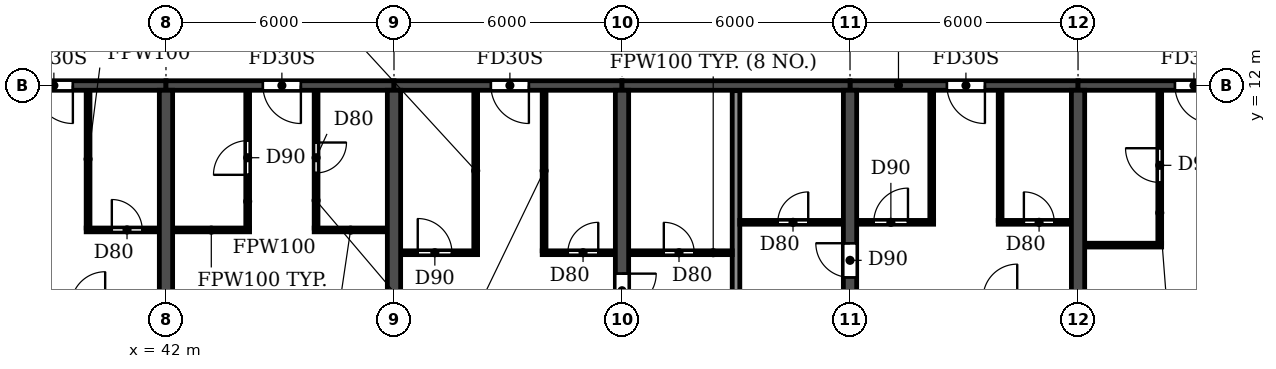
"""IFC4 building model, lengths in metres.
Left out: names, types, materials, properties, quantities, classifications, styles, units other than length and angle.
Written with IfcOpenShell. Run it as: python <this file> out.ifc"""

import sys

from ifc_helpers import new_model, si_unit, direction, frame, frame_2d, origin, place, context, subcontext, project, spatial, rectangle, extrude, element, fill, save


model = new_model("IFC4")
c1 = context("Model", 3, precision=1e-05, world=origin(), true_north=direction((0.0, 1.0)))
c2 = subcontext(c1, "Body", "Model", "MODEL_VIEW")
j1 = project(units=[si_unit("LENGTHUNIT", "METRE"), si_unit("PLANEANGLEUNIT", "RADIAN")], contexts=[c1])
p1 = place(None, origin())
s1 = spatial("IfcSite", under=j1, at=p1, CompositionType="ELEMENT")
p2 = place(p1, origin())
s2 = spatial("IfcBuilding", under=s1, at=p2, CompositionType="ELEMENT")
p3 = place(p2, frame((0.0, 0.0, 72.9)))
s3 = spatial("IfcBuildingStorey", under=s2, at=p3, CompositionType="ELEMENT", Elevation=72.9)
for number, where, z_axis, x_axis in (
    (1, (42.0, 0.2, 0.0), (0.0, 0.0, 1.0), (0.0, 1.0, 0.0)),
    (2, (48.0, 0.2, 0.0), (0.0, 0.0, 1.0), (0.0, 1.0, 0.0)),
):
    element("IfcWall", number, at=place(p3, frame(where, z_axis=z_axis, x_axis=x_axis)), inside=s3, PredefinedType="SHEAR", context=c2, shape_type="SweptSolid", body=[
        extrude(rectangle(XDim=11.675, YDim=0.35, at=frame_2d((5.837, 0.0))), origin(), (0.0, 0.0, 1.0), 3.06),
    ])
p4 = place(p3, frame((54.0, 0.2, 0.0), z_axis=(0.0, 0.0, 1.0), x_axis=(0.0, 1.0, 0.0)))
e3 = element("IfcWall", 3, at=p4, inside=s3, PredefinedType="SHEAR", context=c2, shape_type="SweptSolid", body=[
    extrude(rectangle(XDim=11.675, YDim=0.35, at=frame_2d((5.837, 0.0))), origin(), (0.0, 0.0, 1.0), 3.06),
])
p5 = place(p4, frame((5.95, 0.0, 0.0)))
e4 = element("IfcOpeningElement", 4, at=p5, cuts=e3, PredefinedType="OPENING", context=c2, shape_type="SweptSolid", body=[
    extrude(rectangle(XDim=0.9, YDim=2.1, at=frame_2d((0.45, 1.05))), frame((0.0, 0.185, 0.0), z_axis=(0.0, -1.0, 0.0), x_axis=(1.0, 0.0, 0.0)), (0.0, 0.0, 1.0), 0.37),
])
p6 = place(p3, frame((60.0, 0.2, 0.0), z_axis=(0.0, 0.0, 1.0), x_axis=(0.0, 1.0, 0.0)))
e5 = element("IfcWall", 5, at=p6, inside=s3, PredefinedType="SHEAR", context=c2, shape_type="SweptSolid", body=[
    extrude(rectangle(XDim=11.675, YDim=0.35, at=frame_2d((5.837, 0.0))), origin(), (0.0, 0.0, 1.0), 3.06),
])
p7 = place(p6, frame((6.75, 0.0, 0.0)))
e6 = element("IfcOpeningElement", 6, at=p7, cuts=e5, PredefinedType="OPENING", context=c2, shape_type="SweptSolid", body=[
    extrude(rectangle(XDim=0.9, YDim=2.1, at=frame_2d((0.45, 1.05))), frame((0.0, 0.185, 0.0), z_axis=(0.0, -1.0, 0.0), x_axis=(1.0, 0.0, 0.0)), (0.0, 0.0, 1.0), 0.37),
])
p8 = place(p3, frame((66.0, 0.2, 0.0), z_axis=(0.0, 0.0, 1.0), x_axis=(0.0, 1.0, 0.0)))
e7 = element("IfcWall", 7, at=p8, inside=s3, PredefinedType="SHEAR", context=c2, shape_type="SweptSolid", body=[
    extrude(rectangle(XDim=11.675, YDim=0.35, at=frame_2d((5.837, 0.0))), origin(), (0.0, 0.0, 1.0), 3.06),
])
p9 = place(p3, frame((36.0, 12.0, 0.0), z_axis=(0.0, 0.0, 1.0), x_axis=(1.0, 0.0, 0.0)))
e8 = element("IfcWall", 8, at=p9, inside=s3, PredefinedType="SHEAR", context=c2, shape_type="SweptSolid", body=[
    extrude(rectangle(XDim=6.0, YDim=0.25, at=frame_2d((3.0, 0.0))), origin(), (0.0, 0.0, 1.0), 2.46),
])
p10 = place(p9, frame((2.55, 0.0, 0.0)))
e9 = element("IfcOpeningElement", 9, at=p10, cuts=e8, PredefinedType="OPENING", context=c2, shape_type="SweptSolid", body=[
    extrude(rectangle(XDim=1.0, YDim=2.1, at=frame_2d((0.5, 1.05))), frame((0.0, 0.135, 0.0), z_axis=(0.0, -1.0, 0.0), x_axis=(1.0, 0.0, 0.0)), (0.0, 0.0, 1.0), 0.27),
])
p11 = place(p3, frame((42.0, 12.0, 0.0), z_axis=(0.0, 0.0, 1.0), x_axis=(1.0, 0.0, 0.0)))
e10 = element("IfcWall", 10, at=p11, inside=s3, PredefinedType="SHEAR", context=c2, shape_type="SweptSolid", body=[
    extrude(rectangle(XDim=6.0, YDim=0.25, at=frame_2d((3.0, 0.0))), origin(), (0.0, 0.0, 1.0), 2.46),
])
p12 = place(p11, frame((2.55, 0.0, 0.0)))
e11 = element("IfcOpeningElement", 11, at=p12, cuts=e10, PredefinedType="OPENING", context=c2, shape_type="SweptSolid", body=[
    extrude(rectangle(XDim=1.0, YDim=2.1, at=frame_2d((0.5, 1.05))), frame((0.0, 0.135, 0.0), z_axis=(0.0, -1.0, 0.0), x_axis=(1.0, 0.0, 0.0)), (0.0, 0.0, 1.0), 0.27),
])
p13 = place(p3, frame((48.0, 12.0, 0.0), z_axis=(0.0, 0.0, 1.0), x_axis=(1.0, 0.0, 0.0)))
e12 = element("IfcWall", 12, at=p13, inside=s3, PredefinedType="SHEAR", context=c2, shape_type="SweptSolid", body=[
    extrude(rectangle(XDim=6.0, YDim=0.25, at=frame_2d((3.0, 0.0))), origin(), (0.0, 0.0, 1.0), 2.46),
])
p14 = place(p13, frame((2.55, 0.0, 0.0)))
e13 = element("IfcOpeningElement", 13, at=p14, cuts=e12, PredefinedType="OPENING", context=c2, shape_type="SweptSolid", body=[
    extrude(rectangle(XDim=1.0, YDim=2.1, at=frame_2d((0.5, 1.05))), frame((0.0, 0.135, 0.0), z_axis=(0.0, -1.0, 0.0), x_axis=(1.0, 0.0, 0.0)), (0.0, 0.0, 1.0), 0.27),
])
p15 = place(p3, frame((54.0, 12.0, 0.0), z_axis=(0.0, 0.0, 1.0), x_axis=(1.0, 0.0, 0.0)))
e14 = element("IfcWall", 14, at=p15, inside=s3, PredefinedType="SHEAR", context=c2, shape_type="SweptSolid", body=[
    extrude(rectangle(XDim=6.0, YDim=0.25, at=frame_2d((3.0, 0.0))), origin(), (0.0, 0.0, 1.0), 2.46),
])
p16 = place(p3, frame((60.0, 12.0, 0.0), z_axis=(0.0, 0.0, 1.0), x_axis=(1.0, 0.0, 0.0)))
e15 = element("IfcWall", 15, at=p16, inside=s3, PredefinedType="SHEAR", context=c2, shape_type="SweptSolid", body=[
    extrude(rectangle(XDim=6.0, YDim=0.25, at=frame_2d((3.0, 0.0))), origin(), (0.0, 0.0, 1.0), 2.46),
])
p17 = place(p16, frame((2.55, 0.0, 0.0)))
e16 = element("IfcOpeningElement", 16, at=p17, cuts=e15, PredefinedType="OPENING", context=c2, shape_type="SweptSolid", body=[
    extrude(rectangle(XDim=1.0, YDim=2.1, at=frame_2d((0.5, 1.05))), frame((0.0, 0.135, 0.0), z_axis=(0.0, -1.0, 0.0), x_axis=(1.0, 0.0, 0.0)), (0.0, 0.0, 1.0), 0.27),
])
p18 = place(p3, frame((66.0, 12.0, 0.0), z_axis=(0.0, 0.0, 1.0), x_axis=(1.0, 0.0, 0.0)))
e17 = element("IfcWall", 17, at=p18, inside=s3, PredefinedType="SHEAR", context=c2, shape_type="SweptSolid", body=[
    extrude(rectangle(XDim=6.0, YDim=0.25, at=frame_2d((3.0, 0.0))), origin(), (0.0, 0.0, 1.0), 2.46),
])
p19 = place(p18, frame((2.55, 0.0, 0.0)))
e18 = element("IfcOpeningElement", 18, at=p19, cuts=e17, PredefinedType="OPENING", context=c2, shape_type="SweptSolid", body=[
    extrude(rectangle(XDim=1.0, YDim=2.1, at=frame_2d((0.5, 1.05))), frame((0.0, 0.135, 0.0), z_axis=(0.0, -1.0, 0.0), x_axis=(1.0, 0.0, 0.0)), (0.0, 0.0, 1.0), 0.27),
])
p20 = place(p3, frame((57.0, 0.06, 0.0), z_axis=(0.0, 0.0, 1.0), x_axis=(0.0, 1.0, 0.0)))
e19 = element("IfcWall", 19, at=p20, inside=s3, PredefinedType="PARTITIONING", context=c2, shape_type="SweptSolid", body=[
    extrude(rectangle(XDim=11.805, YDim=0.2, at=frame_2d((5.902, 0.0))), origin(), (0.0, 0.0, 1.0), 3.06),
])
p21 = place(p3, frame((48.185, 7.6, 0.0), z_axis=(0.0, 0.0, 1.0), x_axis=(1.0, 0.0, 0.0)))
e20 = element("IfcWall", 20, at=p21, inside=s3, PredefinedType="PARTITIONING", context=c2, shape_type="SweptSolid", body=[
    extrude(rectangle(XDim=2.015, YDim=0.1, at=frame_2d((1.007, 0.0))), origin(), (0.0, 0.0, 1.0), 3.06),
])
p22 = place(p21, frame((0.44, 0.0, 0.0)))
e21 = element("IfcOpeningElement", 21, at=p22, cuts=e20, PredefinedType="OPENING", context=c2, shape_type="SweptSolid", body=[
    extrude(rectangle(XDim=0.9, YDim=2.1, at=frame_2d((0.45, 1.05))), frame((0.0, 0.06, 0.0), z_axis=(0.0, -1.0, 0.0), x_axis=(1.0, 0.0, 0.0)), (0.0, 0.0, 1.0), 0.12),
])
p23 = place(p3, frame((51.9, 7.6, 0.0), z_axis=(0.0, 0.0, 1.0), x_axis=(1.0, 0.0, 0.0)))
e22 = element("IfcWall", 22, at=p23, inside=s3, PredefinedType="PARTITIONING", context=c2, shape_type="SweptSolid", body=[
    extrude(rectangle(XDim=1.915, YDim=0.1, at=frame_2d((0.958, 0.0))), origin(), (0.0, 0.0, 1.0), 3.06),
])
p24 = place(p23, frame((0.675, 0.0, 0.0)))
e23 = element("IfcOpeningElement", 23, at=p24, cuts=e22, PredefinedType="OPENING", context=c2, shape_type="SweptSolid", body=[
    extrude(rectangle(XDim=0.8, YDim=2.1, at=frame_2d((0.4, 1.05))), frame((0.0, 0.06, 0.0), z_axis=(0.0, -1.0, 0.0), x_axis=(1.0, 0.0, 0.0)), (0.0, 0.0, 1.0), 0.12),
])
p25 = place(p3, frame((54.185, 7.6, 0.0), z_axis=(0.0, 0.0, 1.0), x_axis=(1.0, 0.0, 0.0)))
e24 = element("IfcWall", 24, at=p25, inside=s3, PredefinedType="PARTITIONING", context=c2, shape_type="SweptSolid", body=[
    extrude(rectangle(XDim=2.715, YDim=0.1, at=frame_2d((1.357, 0.0))), origin(), (0.0, 0.0, 1.0), 3.06),
])
p26 = place(p25, frame((0.915, 0.0, 0.0)))
e25 = element("IfcOpeningElement", 25, at=p26, cuts=e24, PredefinedType="OPENING", context=c2, shape_type="SweptSolid", body=[
    extrude(rectangle(XDim=0.8, YDim=2.1, at=frame_2d((0.4, 1.05))), frame((0.0, 0.06, 0.0), z_axis=(0.0, -1.0, 0.0), x_axis=(1.0, 0.0, 0.0)), (0.0, 0.0, 1.0), 0.12),
])
p27 = place(p3, frame((66.185, 7.8, 0.0), z_axis=(0.0, 0.0, 1.0), x_axis=(1.0, 0.0, 0.0)))
e26 = element("IfcWall", 26, at=p27, inside=s3, PredefinedType="PARTITIONING", context=c2, shape_type="SweptSolid", body=[
    extrude(rectangle(XDim=2.015, YDim=0.1, at=frame_2d((1.007, 0.0))), origin(), (0.0, 0.0, 1.0), 3.06),
])
p28 = place(p3, frame((39.9, 8.2, 0.0), z_axis=(0.0, 0.0, 1.0), x_axis=(1.0, 0.0, 0.0)))
e27 = element("IfcWall", 27, at=p28, inside=s3, PredefinedType="PARTITIONING", context=c2, shape_type="SweptSolid", body=[
    extrude(rectangle(XDim=1.915, YDim=0.1, at=frame_2d((0.958, 0.0))), origin(), (0.0, 0.0, 1.0), 3.06),
])
p29 = place(p28, frame((0.675, 0.0, 0.0)))
e28 = element("IfcOpeningElement", 28, at=p29, cuts=e27, PredefinedType="OPENING", context=c2, shape_type="SweptSolid", body=[
    extrude(rectangle(XDim=0.8, YDim=2.1, at=frame_2d((0.4, 1.05))), frame((0.0, 0.06, 0.0), z_axis=(0.0, -1.0, 0.0), x_axis=(1.0, 0.0, 0.0)), (0.0, 0.0, 1.0), 0.12),
])
p30 = place(p3, frame((42.185, 8.2, 0.0), z_axis=(0.0, 0.0, 1.0), x_axis=(1.0, 0.0, 0.0)))
e29 = element("IfcWall", 29, at=p30, inside=s3, PredefinedType="PARTITIONING", context=c2, shape_type="SweptSolid", body=[
    extrude(rectangle(XDim=2.015, YDim=0.1, at=frame_2d((1.007, 0.0))), origin(), (0.0, 0.0, 1.0), 3.06),
])
p31 = place(p3, frame((45.9, 8.2, 0.0), z_axis=(0.0, 0.0, 1.0), x_axis=(1.0, 0.0, 0.0)))
e30 = element("IfcWall", 30, at=p31, inside=s3, PredefinedType="PARTITIONING", context=c2, shape_type="SweptSolid", body=[
    extrude(rectangle(XDim=1.915, YDim=0.1, at=frame_2d((0.958, 0.0))), origin(), (0.0, 0.0, 1.0), 3.06),
])
p32 = place(p3, frame((57.1, 8.4, 0.0), z_axis=(0.0, 0.0, 1.0), x_axis=(1.0, 0.0, 0.0)))
e31 = element("IfcWall", 31, at=p32, inside=s3, PredefinedType="PARTITIONING", context=c2, shape_type="SweptSolid", body=[
    extrude(rectangle(XDim=2.715, YDim=0.1, at=frame_2d((1.357, 0.0))), origin(), (0.0, 0.0, 1.0), 3.06),
])
p33 = place(p32, frame((1.0, 0.0, 0.0)))
e32 = element("IfcOpeningElement", 32, at=p33, cuts=e31, PredefinedType="OPENING", context=c2, shape_type="SweptSolid", body=[
    extrude(rectangle(XDim=0.8, YDim=2.1, at=frame_2d((0.4, 1.05))), frame((0.0, 0.06, 0.0), z_axis=(0.0, -1.0, 0.0), x_axis=(1.0, 0.0, 0.0)), (0.0, 0.0, 1.0), 0.12),
])
p34 = place(p3, frame((60.185, 8.4, 0.0), z_axis=(0.0, 0.0, 1.0), x_axis=(1.0, 0.0, 0.0)))
e33 = element("IfcWall", 33, at=p34, inside=s3, PredefinedType="PARTITIONING", context=c2, shape_type="SweptSolid", body=[
    extrude(rectangle(XDim=2.015, YDim=0.1, at=frame_2d((1.007, 0.0))), origin(), (0.0, 0.0, 1.0), 3.06),
])
p35 = place(p34, frame((0.44, 0.0, 0.0)))
e34 = element("IfcOpeningElement", 34, at=p35, cuts=e33, PredefinedType="OPENING", context=c2, shape_type="SweptSolid", body=[
    extrude(rectangle(XDim=0.9, YDim=2.1, at=frame_2d((0.45, 1.05))), frame((0.0, 0.06, 0.0), z_axis=(0.0, -1.0, 0.0), x_axis=(1.0, 0.0, 0.0)), (0.0, 0.0, 1.0), 0.12),
])
p36 = place(p3, frame((63.9, 8.4, 0.0), z_axis=(0.0, 0.0, 1.0), x_axis=(1.0, 0.0, 0.0)))
e35 = element("IfcWall", 35, at=p36, inside=s3, PredefinedType="PARTITIONING", context=c2, shape_type="SweptSolid", body=[
    extrude(rectangle(XDim=1.915, YDim=0.1, at=frame_2d((0.958, 0.0))), origin(), (0.0, 0.0, 1.0), 3.06),
])
p37 = place(p36, frame((0.675, 0.0, 0.0)))
e36 = element("IfcOpeningElement", 36, at=p37, cuts=e35, PredefinedType="OPENING", context=c2, shape_type="SweptSolid", body=[
    extrude(rectangle(XDim=0.8, YDim=2.1, at=frame_2d((0.4, 1.05))), frame((0.0, 0.06, 0.0), z_axis=(0.0, -1.0, 0.0), x_axis=(1.0, 0.0, 0.0)), (0.0, 0.0, 1.0), 0.12),
])
p38 = place(p3, frame((39.95, 8.25, 0.0), z_axis=(0.0, 0.0, 1.0), x_axis=(0.0, 1.0, 0.0)))
e37 = element("IfcWall", 37, at=p38, inside=s3, PredefinedType="PARTITIONING", context=c2, shape_type="SweptSolid", body=[
    extrude(rectangle(XDim=3.615, YDim=0.1, at=frame_2d((1.808, 0.0))), origin(), (0.0, 0.0, 1.0), 3.06),
])
p39 = place(p3, frame((44.15, 8.25, 0.0), z_axis=(0.0, 0.0, 1.0), x_axis=(0.0, 1.0, 0.0)))
e38 = element("IfcWall", 38, at=p39, inside=s3, PredefinedType="PARTITIONING", context=c2, shape_type="SweptSolid", body=[
    extrude(rectangle(XDim=3.615, YDim=0.1, at=frame_2d((1.808, 0.0))), origin(), (0.0, 0.0, 1.0), 3.06),
])
p40 = place(p39, frame((1.4, 0.0, 0.0)))
e39 = element("IfcOpeningElement", 39, at=p40, cuts=e38, PredefinedType="OPENING", context=c2, shape_type="SweptSolid", body=[
    extrude(rectangle(XDim=0.9, YDim=2.1, at=frame_2d((0.45, 1.05))), frame((0.0, 0.06, 0.0), z_axis=(0.0, -1.0, 0.0), x_axis=(1.0, 0.0, 0.0)), (0.0, 0.0, 1.0), 0.12),
])
p41 = place(p3, frame((45.95, 8.25, 0.0), z_axis=(0.0, 0.0, 1.0), x_axis=(0.0, 1.0, 0.0)))
e40 = element("IfcWall", 40, at=p41, inside=s3, PredefinedType="PARTITIONING", context=c2, shape_type="SweptSolid", body=[
    extrude(rectangle(XDim=3.615, YDim=0.1, at=frame_2d((1.808, 0.0))), origin(), (0.0, 0.0, 1.0), 3.06),
])
p42 = place(p41, frame((1.45, 0.0, 0.0)))
e41 = element("IfcOpeningElement", 41, at=p42, cuts=e40, PredefinedType="OPENING", context=c2, shape_type="SweptSolid", body=[
    extrude(rectangle(XDim=0.8, YDim=2.1, at=frame_2d((0.4, 1.05))), frame((0.0, 0.06, 0.0), z_axis=(0.0, -1.0, 0.0), x_axis=(1.0, 0.0, 0.0)), (0.0, 0.0, 1.0), 0.12),
])
for number, where, z_axis, x_axis in (
    (42, (50.15, 7.65, 0.0), (0.0, 0.0, 1.0), (0.0, 1.0, 0.0)),
    (43, (51.95, 7.65, 0.0), (0.0, 0.0, 1.0), (0.0, 1.0, 0.0)),
):
    element("IfcWall", number, at=place(p3, frame(where, z_axis=z_axis, x_axis=x_axis)), inside=s3, PredefinedType="PARTITIONING", context=c2, shape_type="SweptSolid", body=[
        extrude(rectangle(XDim=4.215, YDim=0.1, at=frame_2d((2.107, 0.0))), origin(), (0.0, 0.0, 1.0), 3.06),
    ])
for number, where, z_axis, x_axis in (
    (44, (62.15, 8.45, 0.0), (0.0, 0.0, 1.0), (0.0, 1.0, 0.0)),
    (45, (63.95, 8.45, 0.0), (0.0, 0.0, 1.0), (0.0, 1.0, 0.0)),
):
    element("IfcWall", number, at=place(p3, frame(where, z_axis=z_axis, x_axis=x_axis)), inside=s3, PredefinedType="PARTITIONING", context=c2, shape_type="SweptSolid", body=[
        extrude(rectangle(XDim=3.415, YDim=0.1, at=frame_2d((1.708, 0.0))), origin(), (0.0, 0.0, 1.0), 3.06),
    ])
p43 = place(p3, frame((68.15, 7.85, 0.0), z_axis=(0.0, 0.0, 1.0), x_axis=(0.0, 1.0, 0.0)))
e46 = element("IfcWall", 46, at=p43, inside=s3, PredefinedType="PARTITIONING", context=c2, shape_type="SweptSolid", body=[
    extrude(rectangle(XDim=4.015, YDim=0.1, at=frame_2d((2.007, 0.0))), origin(), (0.0, 0.0, 1.0), 3.06),
])
p44 = place(p43, frame((1.6, 0.0, 0.0)))
e47 = element("IfcOpeningElement", 47, at=p44, cuts=e46, PredefinedType="OPENING", context=c2, shape_type="SweptSolid", body=[
    extrude(rectangle(XDim=0.9, YDim=2.1, at=frame_2d((0.45, 1.05))), frame((0.0, 0.06, 0.0), z_axis=(0.0, -1.0, 0.0), x_axis=(1.0, 0.0, 0.0)), (0.0, 0.0, 1.0), 0.12),
])
p45 = place(p10, frame((1.0, 0.0, 0.0), z_axis=(0.0, 0.0, 1.0), x_axis=(-1.0, 0.0, 0.0)))
e48 = element("IfcDoor", 48, at=p45, inside=s3, OperationType="SINGLE_SWING_LEFT", PredefinedType="DOOR", context=c2, shape_type="SweptSolid", body=[
    extrude(rectangle(XDim=1.0, YDim=2.1, at=frame_2d((0.5, 1.05))), frame((0.0, 0.025, 0.0), z_axis=(0.0, -1.0, 0.0), x_axis=(1.0, 0.0, 0.0)), (0.0, 0.0, 1.0), 0.05),
])
fill(e9, e48)
p46 = place(p29, origin())
e49 = element("IfcDoor", 49, at=p46, inside=s3, OperationType="SINGLE_SWING_LEFT", PredefinedType="DOOR", context=c2, shape_type="SweptSolid", body=[
    extrude(rectangle(XDim=0.8, YDim=2.1, at=frame_2d((0.4, 1.05))), frame((0.0, 0.025, 0.0), z_axis=(0.0, -1.0, 0.0), x_axis=(1.0, 0.0, 0.0)), (0.0, 0.0, 1.0), 0.05),
])
fill(e28, e49)
p47 = place(p40, origin())
e50 = element("IfcDoor", 50, at=p47, inside=s3, OperationType="SINGLE_SWING_LEFT", PredefinedType="DOOR", context=c2, shape_type="SweptSolid", body=[
    extrude(rectangle(XDim=0.9, YDim=2.1, at=frame_2d((0.45, 1.05))), frame((0.0, 0.025, 0.0), z_axis=(0.0, -1.0, 0.0), x_axis=(1.0, 0.0, 0.0)), (0.0, 0.0, 1.0), 0.05),
])
fill(e39, e50)
p48 = place(p12, frame((1.0, 0.0, 0.0), z_axis=(0.0, 0.0, 1.0), x_axis=(-1.0, 0.0, 0.0)))
e51 = element("IfcDoor", 51, at=p48, inside=s3, OperationType="SINGLE_SWING_LEFT", PredefinedType="DOOR", context=c2, shape_type="SweptSolid", body=[
    extrude(rectangle(XDim=1.0, YDim=2.1, at=frame_2d((0.5, 1.05))), frame((0.0, 0.025, 0.0), z_axis=(0.0, -1.0, 0.0), x_axis=(1.0, 0.0, 0.0)), (0.0, 0.0, 1.0), 0.05),
])
fill(e11, e51)
p49 = place(p42, frame((0.8, 0.0, 0.0), z_axis=(0.0, 0.0, 1.0), x_axis=(-1.0, 0.0, 0.0)))
e52 = element("IfcDoor", 52, at=p49, inside=s3, OperationType="SINGLE_SWING_LEFT", PredefinedType="DOOR", context=c2, shape_type="SweptSolid", body=[
    extrude(rectangle(XDim=0.8, YDim=2.1, at=frame_2d((0.4, 1.05))), frame((0.0, 0.025, 0.0), z_axis=(0.0, -1.0, 0.0), x_axis=(1.0, 0.0, 0.0)), (0.0, 0.0, 1.0), 0.05),
])
fill(e41, e52)
p50 = place(p26, origin())
e53 = element("IfcDoor", 53, at=p50, inside=s3, OperationType="SINGLE_SWING_LEFT", PredefinedType="DOOR", context=c2, shape_type="SweptSolid", body=[
    extrude(rectangle(XDim=0.8, YDim=2.1, at=frame_2d((0.4, 1.05))), frame((0.0, 0.025, 0.0), z_axis=(0.0, -1.0, 0.0), x_axis=(1.0, 0.0, 0.0)), (0.0, 0.0, 1.0), 0.05),
])
fill(e25, e53)
p51 = place(p22, origin())
e54 = element("IfcDoor", 54, at=p51, inside=s3, OperationType="SINGLE_SWING_LEFT", PredefinedType="DOOR", context=c2, shape_type="SweptSolid", body=[
    extrude(rectangle(XDim=0.9, YDim=2.1, at=frame_2d((0.45, 1.05))), frame((0.0, 0.025, 0.0), z_axis=(0.0, -1.0, 0.0), x_axis=(1.0, 0.0, 0.0)), (0.0, 0.0, 1.0), 0.05),
])
fill(e21, e54)
p52 = place(p14, frame((1.0, 0.0, 0.0), z_axis=(0.0, 0.0, 1.0), x_axis=(-1.0, 0.0, 0.0)))
e55 = element("IfcDoor", 55, at=p52, inside=s3, OperationType="SINGLE_SWING_LEFT", PredefinedType="DOOR", context=c2, shape_type="SweptSolid", body=[
    extrude(rectangle(XDim=1.0, YDim=2.1, at=frame_2d((0.5, 1.05))), frame((0.0, 0.025, 0.0), z_axis=(0.0, -1.0, 0.0), x_axis=(1.0, 0.0, 0.0)), (0.0, 0.0, 1.0), 0.05),
])
fill(e13, e55)
p53 = place(p24, origin())
e56 = element("IfcDoor", 56, at=p53, inside=s3, OperationType="SINGLE_SWING_RIGHT", PredefinedType="DOOR", context=c2, shape_type="SweptSolid", body=[
    extrude(rectangle(XDim=0.8, YDim=2.1, at=frame_2d((0.4, 1.05))), frame((0.0, 0.025, 0.0), z_axis=(0.0, -1.0, 0.0), x_axis=(1.0, 0.0, 0.0)), (0.0, 0.0, 1.0), 0.05),
])
fill(e23, e56)
p54 = place(p5, frame((0.9, 0.0, 0.0), z_axis=(0.0, 0.0, 1.0), x_axis=(-1.0, 0.0, 0.0)))
e57 = element("IfcDoor", 57, at=p54, inside=s3, OperationType="SINGLE_SWING_LEFT", PredefinedType="DOOR", context=c2, shape_type="SweptSolid", body=[
    extrude(rectangle(XDim=0.9, YDim=2.1, at=frame_2d((0.45, 1.05))), frame((0.0, 0.025, 0.0), z_axis=(0.0, -1.0, 0.0), x_axis=(1.0, 0.0, 0.0)), (0.0, 0.0, 1.0), 0.05),
])
fill(e4, e57)
p55 = place(p33, origin())
e58 = element("IfcDoor", 58, at=p55, inside=s3, OperationType="SINGLE_SWING_RIGHT", PredefinedType="DOOR", context=c2, shape_type="SweptSolid", body=[
    extrude(rectangle(XDim=0.8, YDim=2.1, at=frame_2d((0.4, 1.05))), frame((0.0, 0.025, 0.0), z_axis=(0.0, -1.0, 0.0), x_axis=(1.0, 0.0, 0.0)), (0.0, 0.0, 1.0), 0.05),
])
fill(e32, e58)
p56 = place(p7, origin())
e59 = element("IfcDoor", 59, at=p56, inside=s3, OperationType="SINGLE_SWING_RIGHT", PredefinedType="DOOR", context=c2, shape_type="SweptSolid", body=[
    extrude(rectangle(XDim=0.9, YDim=2.1, at=frame_2d((0.45, 1.05))), frame((0.0, 0.025, 0.0), z_axis=(0.0, -1.0, 0.0), x_axis=(1.0, 0.0, 0.0)), (0.0, 0.0, 1.0), 0.05),
])
fill(e6, e59)
p57 = place(p35, origin())
e60 = element("IfcDoor", 60, at=p57, inside=s3, OperationType="SINGLE_SWING_RIGHT", PredefinedType="DOOR", context=c2, shape_type="SweptSolid", body=[
    extrude(rectangle(XDim=0.9, YDim=2.1, at=frame_2d((0.45, 1.05))), frame((0.0, 0.025, 0.0), z_axis=(0.0, -1.0, 0.0), x_axis=(1.0, 0.0, 0.0)), (0.0, 0.0, 1.0), 0.05),
])
fill(e34, e60)
p58 = place(p17, frame((1.0, 0.0, 0.0), z_axis=(0.0, 0.0, 1.0), x_axis=(-1.0, 0.0, 0.0)))
e61 = element("IfcDoor", 61, at=p58, inside=s3, OperationType="SINGLE_SWING_LEFT", PredefinedType="DOOR", context=c2, shape_type="SweptSolid", body=[
    extrude(rectangle(XDim=1.0, YDim=2.1, at=frame_2d((0.5, 1.05))), frame((0.0, 0.025, 0.0), z_axis=(0.0, -1.0, 0.0), x_axis=(1.0, 0.0, 0.0)), (0.0, 0.0, 1.0), 0.05),
])
fill(e16, e61)
p59 = place(p37, origin())
e62 = element("IfcDoor", 62, at=p59, inside=s3, OperationType="SINGLE_SWING_LEFT", PredefinedType="DOOR", context=c2, shape_type="SweptSolid", body=[
    extrude(rectangle(XDim=0.8, YDim=2.1, at=frame_2d((0.4, 1.05))), frame((0.0, 0.025, 0.0), z_axis=(0.0, -1.0, 0.0), x_axis=(1.0, 0.0, 0.0)), (0.0, 0.0, 1.0), 0.05),
])
fill(e36, e62)
p60 = place(p44, origin())
e63 = element("IfcDoor", 63, at=p60, inside=s3, OperationType="SINGLE_SWING_RIGHT", PredefinedType="DOOR", context=c2, shape_type="SweptSolid", body=[
    extrude(rectangle(XDim=0.9, YDim=2.1, at=frame_2d((0.45, 1.05))), frame((0.0, 0.025, 0.0), z_axis=(0.0, -1.0, 0.0), x_axis=(1.0, 0.0, 0.0)), (0.0, 0.0, 1.0), 0.05),
])
fill(e47, e63)
p61 = place(p19, frame((1.0, 0.0, 0.0), z_axis=(0.0, 0.0, 1.0), x_axis=(-1.0, 0.0, 0.0)))
e64 = element("IfcDoor", 64, at=p61, inside=s3, OperationType="SINGLE_SWING_LEFT", PredefinedType="DOOR", context=c2, shape_type="SweptSolid", body=[
    extrude(rectangle(XDim=1.0, YDim=2.1, at=frame_2d((0.5, 1.05))), frame((0.0, 0.025, 0.0), z_axis=(0.0, -1.0, 0.0), x_axis=(1.0, 0.0, 0.0)), (0.0, 0.0, 1.0), 0.05),
])
fill(e18, e64)
save(model, sys.argv[1])
